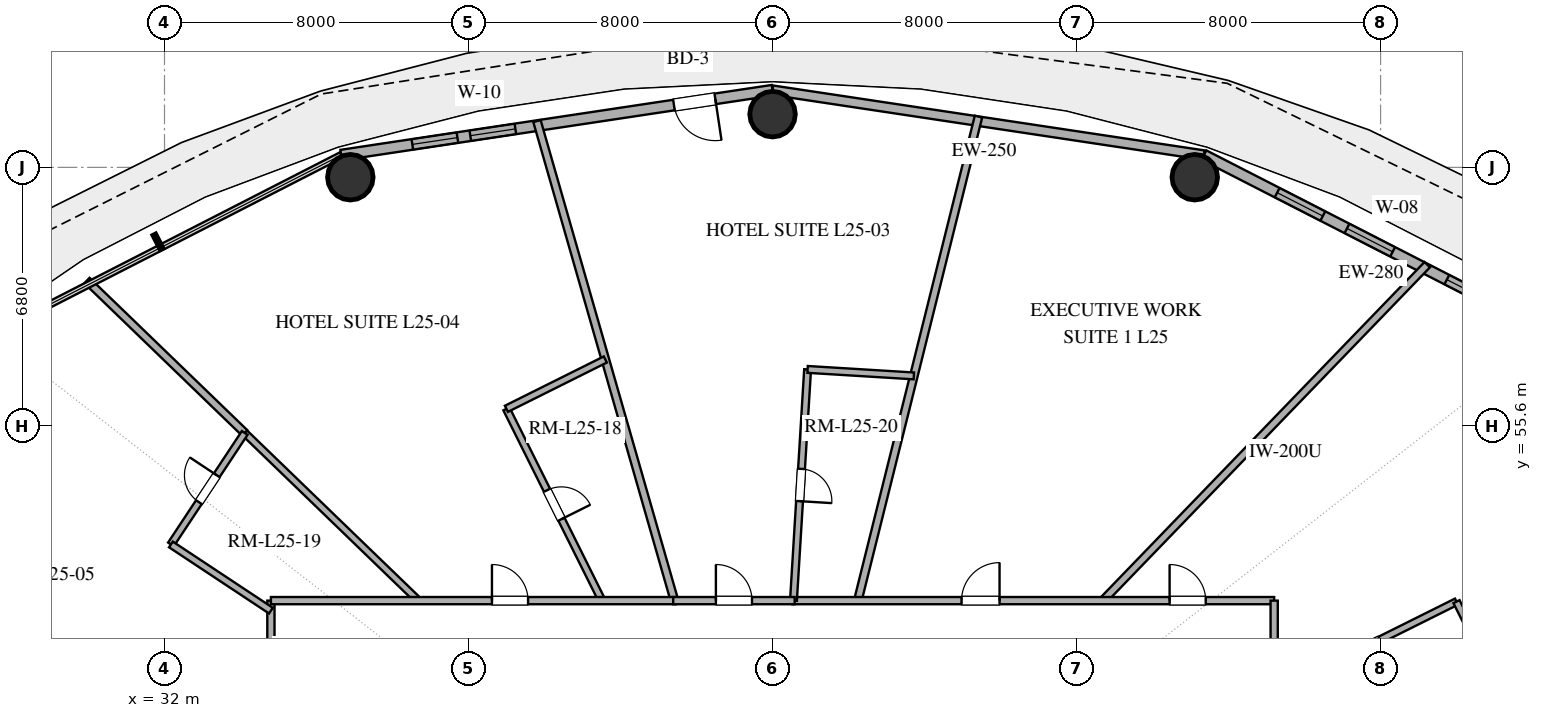
"""IFC4 building model, lengths in metres.
Left out: names, types, materials, properties, quantities, classifications, styles, units other than length and angle.
Written with IfcOpenShell. Run it as: python <this file> out.ifc"""

import sys

from ifc_helpers import new_model, si_unit, direction, frame, frame_2d, origin, origin_2d, place, context, subcontext, project, spatial, rectangle, hollow_circle, extrude, element, fill, save


model = new_model("IFC4")
c1 = context("Model", 3, precision=1e-05, world=origin(), true_north=direction((0.0, 1.0)))
c2 = subcontext(c1, "Body", "Model", "MODEL_VIEW")
j1 = project(units=[si_unit("LENGTHUNIT", "METRE"), si_unit("PLANEANGLEUNIT", "RADIAN")], contexts=[c1])
p1 = place(None, origin())
s1 = spatial("IfcSite", under=j1, at=p1, CompositionType="ELEMENT")
p2 = place(p1, origin())
s2 = spatial("IfcBuilding", under=s1, at=p2, CompositionType="ELEMENT")
p3 = place(p2, frame((0.0, 0.0, 102.0)))
s3 = spatial("IfcBuildingStorey", under=s2, at=p3, CompositionType="ELEMENT", Elevation=102.0)
for number, where, z_axis, x_axis in (
    (1, (59.11, 62.141, 0.0), (0.0, 0.0, 1.0), (1.0, 0.0, 0.0)),
    (2, (48.0, 63.8, 0.0), (0.0, 0.0, 1.0), (1.0, 0.0, 0.0)),
    (3, (36.89, 62.141, 0.0), (0.0, 0.0, 1.0), (1.0, 0.0, 0.0)),
):
    element("IfcColumn", number, at=place(p3, frame(where, z_axis=z_axis, x_axis=x_axis)), inside=s3, PredefinedType="COLUMN", context=c2, shape_type="SweptSolid", body=[
        extrude(hollow_circle(Radius=0.6, WallThickness=0.032, at=origin_2d()), origin(), (0.0, 0.0, 1.0), 3.38),
    ])
p4 = place(p3, frame((68.84, 57.86, 0.0), z_axis=(0.0, 0.0, 1.0), x_axis=(-0.889959505023, 0.45603955905, 0.0)))
e4 = element("IfcWall", 4, at=p4, inside=s3, PredefinedType="SOLIDWALL", context=c2, shape_type="SweptSolid", body=[
    extrude(rectangle(XDim=10.662, YDim=0.28, at=frame_2d((5.331, 0.0))), origin(), (0.0, 0.0, 1.0), 3.38),
])
p5 = place(p4, frame((1.979, 0.0, 0.85)))
e5 = element("IfcOpeningElement", 5, at=p5, cuts=e4, PredefinedType="OPENING", context=c2, shape_type="SweptSolid", body=[
    extrude(rectangle(XDim=1.5, YDim=1.8, at=frame_2d((0.75, 0.9))), frame((0.0, 0.15, 0.0), z_axis=(0.0, -1.0, 0.0), x_axis=(1.0, 0.0, 0.0)), (0.0, 0.0, 1.0), 0.3),
])
p6 = place(p4, frame((5.082, 0.0, 0.85)))
e6 = element("IfcOpeningElement", 6, at=p6, cuts=e4, PredefinedType="OPENING", context=c2, shape_type="SweptSolid", body=[
    extrude(rectangle(XDim=1.35, YDim=1.8, at=frame_2d((0.675, 0.9))), frame((0.0, 0.15, 0.0), z_axis=(0.0, -1.0, 0.0), x_axis=(1.0, 0.0, 0.0)), (0.0, 0.0, 1.0), 0.3),
])
p7 = place(p4, frame((7.146, 0.0, 0.85)))
e7 = element("IfcOpeningElement", 7, at=p7, cuts=e4, PredefinedType="OPENING", context=c2, shape_type="SweptSolid", body=[
    extrude(rectangle(XDim=1.35, YDim=1.8, at=frame_2d((0.675, 0.9))), frame((0.0, 0.15, 0.0), z_axis=(0.0, -1.0, 0.0), x_axis=(1.0, 0.0, 0.0)), (0.0, 0.0, 1.0), 0.3),
])
p8 = place(p3, frame((59.351, 62.723, 0.0), z_axis=(0.0, 0.0, 1.0), x_axis=(-0.988877774656, 0.148730450117, 0.0)))
e8 = element("IfcWall", 8, at=p8, inside=s3, PredefinedType="SOLIDWALL", context=c2, shape_type="SweptSolid", body=[
    extrude(rectangle(XDim=11.479, YDim=0.25, at=frame_2d((5.74, 0.0))), origin(), (0.0, 0.0, 1.0), 3.38),
])
p9 = place(p3, frame((48.0, 64.43, 0.0), z_axis=(0.0, 0.0, 1.0), x_axis=(-0.988877774656, -0.148730450117, 0.0)))
e9 = element("IfcWall", 9, at=p9, inside=s3, PredefinedType="SOLIDWALL", context=c2, shape_type="SweptSolid", body=[
    extrude(rectangle(XDim=11.479, YDim=0.28, at=frame_2d((5.74, 0.0))), origin(), (0.0, 0.0, 1.0), 3.38),
])
p10 = place(p9, frame((1.524, 0.0, 0.0)))
e10 = element("IfcOpeningElement", 10, at=p10, cuts=e9, PredefinedType="OPENING", context=c2, shape_type="SweptSolid", body=[
    extrude(rectangle(XDim=1.1, YDim=2.25, at=frame_2d((0.55, 1.125))), frame((0.0, 0.15, 0.0), z_axis=(0.0, -1.0, 0.0), x_axis=(1.0, 0.0, 0.0)), (0.0, 0.0, 1.0), 0.3),
])
p11 = place(p9, frame((6.843, 0.0, 0.85)))
e11 = element("IfcOpeningElement", 11, at=p11, cuts=e9, PredefinedType="OPENING", context=c2, shape_type="SweptSolid", body=[
    extrude(rectangle(XDim=1.2, YDim=1.6, at=frame_2d((0.6, 0.8))), frame((0.0, 0.15, 0.0), z_axis=(0.0, -1.0, 0.0), x_axis=(1.0, 0.0, 0.0)), (0.0, 0.0, 1.0), 0.3),
])
p12 = place(p9, frame((8.385, 0.0, 0.85)))
e12 = element("IfcOpeningElement", 12, at=p12, cuts=e9, PredefinedType="OPENING", context=c2, shape_type="SweptSolid", body=[
    extrude(rectangle(XDim=1.2, YDim=1.6, at=frame_2d((0.6, 0.8))), frame((0.0, 0.15, 0.0), z_axis=(0.0, -1.0, 0.0), x_axis=(1.0, 0.0, 0.0)), (0.0, 0.0, 1.0), 0.3),
])
p13 = place(p3, frame((65.228, 59.84, 0.0), z_axis=(0.0, 0.0, 1.0), x_axis=(-0.694672506389, -0.719326149161, 0.0)))
e13 = element("IfcWall", 13, at=p13, inside=s3, PredefinedType="PARTITIONING", context=c2, shape_type="SweptSolid", body=[
    extrude(rectangle(XDim=12.289, YDim=0.2, at=frame_2d((6.145, 0.0))), origin(), (0.0, 0.0, 1.0), 2.74),
])
p14 = place(p3, frame((50.244, 51.0, 0.0), z_axis=(0.0, 0.0, 1.0), x_axis=(0.241918476077, 0.970296578852, 0.0)))
e14 = element("IfcWall", 14, at=p14, inside=s3, PredefinedType="PARTITIONING", context=c2, shape_type="SweptSolid", body=[
    extrude(rectangle(XDim=13.125, YDim=0.2, at=frame_2d((6.563, 0.0))), origin(), (0.0, 0.0, 1.0), 2.74),
])
p15 = place(p3, frame((45.419, 51.0, 0.0), z_axis=(0.0, 0.0, 1.0), x_axis=(-0.275639731411, 0.961261014745, 0.0)))
e15 = element("IfcWall", 15, at=p15, inside=s3, PredefinedType="PARTITIONING", context=c2, shape_type="SweptSolid", body=[
    extrude(rectangle(XDim=13.126, YDim=0.2, at=frame_2d((6.563, 0.0))), origin(), (0.0, 0.0, 1.0), 2.74),
])
p16 = place(p3, frame((48.518, 51.0, 0.0), z_axis=(0.0, 0.0, 1.0), x_axis=(1.0, 0.0, 0.0)))
e16 = element("IfcWall", 16, at=p16, inside=s3, PredefinedType="PARTITIONING", context=c2, shape_type="SweptSolid", body=[
    extrude(rectangle(XDim=12.682, YDim=0.19, at=frame_2d((6.341, 0.0))), origin(), (0.0, 0.0, 1.0), 2.74),
])
p17 = place(p16, frame((4.455, 0.0, 0.0)))
e17 = element("IfcOpeningElement", 17, at=p17, cuts=e16, PredefinedType="OPENING", context=c2, shape_type="SweptSolid", body=[
    extrude(rectangle(XDim=1.0, YDim=2.2, at=frame_2d((0.5, 1.1))), frame((0.0, 0.105, 0.0), z_axis=(0.0, -1.0, 0.0), x_axis=(1.0, 0.0, 0.0)), (0.0, 0.0, 1.0), 0.21),
])
p18 = place(p16, frame((9.93, 0.0, 0.0)))
e18 = element("IfcOpeningElement", 18, at=p18, cuts=e16, PredefinedType="OPENING", context=c2, shape_type="SweptSolid", body=[
    extrude(rectangle(XDim=0.95, YDim=2.15, at=frame_2d((0.475, 1.075))), frame((0.0, 0.105, 0.0), z_axis=(0.0, -1.0, 0.0), x_axis=(1.0, 0.0, 0.0)), (0.0, 0.0, 1.0), 0.21),
])
p19 = place(p3, frame((34.111, 55.413, 0.0), z_axis=(0.0, 0.0, 1.0), x_axis=(0.719318009274, -0.694680935059, 0.0)))
e19 = element("IfcWall", 19, at=p19, inside=s3, PredefinedType="PLUMBINGWALL", context=c2, shape_type="SweptSolid", body=[
    extrude(rectangle(XDim=6.352, YDim=0.18, at=frame_2d((3.176, 0.0))), origin(), (0.0, 0.0, 1.0), 2.74),
])
p20 = place(p3, frame((48.923, 57.084, 0.0), z_axis=(0.0, 0.0, 1.0), x_axis=(-0.061044096749, -0.998135070144, 0.0)))
e20 = element("IfcWall", 20, at=p20, inside=s3, PredefinedType="PLUMBINGWALL", context=c2, shape_type="SweptSolid", body=[
    extrude(rectangle(XDim=6.095, YDim=0.18, at=frame_2d((3.048, 0.0))), origin(), (0.0, 0.0, 1.0), 2.74),
])
p21 = place(p20, frame((2.623, 0.0, 0.0)))
e21 = element("IfcOpeningElement", 21, at=p21, cuts=e20, PredefinedType="OPENING", context=c2, shape_type="SweptSolid", body=[
    extrude(rectangle(XDim=0.85, YDim=2.1, at=frame_2d((0.425, 1.05))), frame((0.0, 0.1, 0.0), z_axis=(0.0, -1.0, 0.0), x_axis=(1.0, 0.0, 0.0)), (0.0, 0.0, 1.0), 0.2),
])
p22 = place(p3, frame((29.959, 59.422, 0.0), z_axis=(0.0, 0.0, 1.0), x_axis=(0.719370121813, -0.694626970281, 0.0)))
e22 = element("IfcWall", 22, at=p22, inside=s3, PredefinedType="PARTITIONING", context=c2, shape_type="SweptSolid", body=[
    extrude(rectangle(XDim=5.772, YDim=0.2, at=frame_2d((2.886, 0.0))), origin(), (0.0, 0.0, 1.0), 2.74),
])
p23 = place(p3, frame((40.997, 56.047, 0.0), z_axis=(0.0, 0.0, 1.0), x_axis=(0.446174269641, -0.894946099556, 0.0)))
e23 = element("IfcWall", 23, at=p23, inside=s3, PredefinedType="PLUMBINGWALL", context=c2, shape_type="SweptSolid", body=[
    extrude(rectangle(XDim=5.639, YDim=0.18, at=frame_2d((2.82, 0.0))), origin(), (0.0, 0.0, 1.0), 2.74),
])
p24 = place(p23, frame((2.395, 0.0, 0.0)))
e24 = element("IfcOpeningElement", 24, at=p24, cuts=e23, PredefinedType="OPENING", context=c2, shape_type="SweptSolid", body=[
    extrude(rectangle(XDim=0.85, YDim=2.1, at=frame_2d((0.425, 1.05))), frame((0.0, 0.1, 0.0), z_axis=(0.0, -1.0, 0.0), x_axis=(1.0, 0.0, 0.0)), (0.0, 0.0, 1.0), 0.2),
])
p25 = place(p3, frame((34.8, 42.775, 0.0), z_axis=(0.0, 0.0, 1.0), x_axis=(0.0, 1.0, 0.0)))
e25 = element("IfcWall", 25, at=p25, inside=s3, PredefinedType="PARTITIONING", context=c2, shape_type="SweptSolid", body=[
    extrude(rectangle(XDim=8.225, YDim=0.19, at=frame_2d((4.112, 0.0))), origin(), (0.0, 0.0, 1.0), 2.74),
])
p26 = place(p25, frame((4.767, 0.0, 0.0)))
e26 = element("IfcOpeningElement", 26, at=p26, cuts=e25, PredefinedType="OPENING", context=c2, shape_type="SweptSolid", body=[
    extrude(rectangle(XDim=0.95, YDim=2.15, at=frame_2d((0.475, 1.075))), frame((0.0, 0.105, 0.0), z_axis=(0.0, -1.0, 0.0), x_axis=(1.0, 0.0, 0.0)), (0.0, 0.0, 1.0), 0.21),
])
p27 = place(p3, frame((65.998, 50.973, 0.0), z_axis=(0.0, 0.0, 1.0), x_axis=(-0.894936648514, -0.446193226244, 0.0)))
e27 = element("IfcWall", 27, at=p27, inside=s3, PredefinedType="PLUMBINGWALL", context=c2, shape_type="SweptSolid", body=[
    extrude(rectangle(XDim=5.361, YDim=0.18, at=frame_2d((2.681, 0.0))), origin(), (0.0, 0.0, 1.0), 2.74),
])
p28 = place(p27, frame((2.256, 0.0, 0.0)))
e28 = element("IfcOpeningElement", 28, at=p28, cuts=e27, PredefinedType="OPENING", context=c2, shape_type="SweptSolid", body=[
    extrude(rectangle(XDim=0.85, YDim=2.1, at=frame_2d((0.425, 1.05))), frame((0.0, 0.1, 0.0), z_axis=(0.0, -1.0, 0.0), x_axis=(1.0, 0.0, 0.0)), (0.0, 0.0, 1.0), 0.2),
])
p29 = place(p3, frame((34.8, 51.0, 0.0), z_axis=(0.0, 0.0, 1.0), x_axis=(1.0, 0.0, 0.0)))
e29 = element("IfcWall", 29, at=p29, inside=s3, PredefinedType="PARTITIONING", context=c2, shape_type="SweptSolid", body=[
    extrude(rectangle(XDim=10.653, YDim=0.19, at=frame_2d((5.326, 0.0))), origin(), (0.0, 0.0, 1.0), 2.74),
])
p30 = place(p29, frame((5.816, 0.0, 0.0)))
e30 = element("IfcOpeningElement", 30, at=p30, cuts=e29, PredefinedType="OPENING", context=c2, shape_type="SweptSolid", body=[
    extrude(rectangle(XDim=0.95, YDim=2.15, at=frame_2d((0.475, 1.075))), frame((0.0, 0.105, 0.0), z_axis=(0.0, -1.0, 0.0), x_axis=(1.0, 0.0, 0.0)), (0.0, 0.0, 1.0), 0.21),
])
p31 = place(p3, frame((61.2, 51.0, 0.0), z_axis=(0.0, 0.0, 1.0), x_axis=(0.0, -1.0, 0.0)))
e31 = element("IfcWall", 31, at=p31, inside=s3, PredefinedType="PARTITIONING", context=c2, shape_type="SweptSolid", body=[
    extrude(rectangle(XDim=9.839, YDim=0.19, at=frame_2d((4.92, 0.0))), origin(), (0.0, 0.0, 1.0), 2.74),
])
p32 = place(p31, frame((7.035, 0.0, 0.0)))
e32 = element("IfcOpeningElement", 32, at=p32, cuts=e31, PredefinedType="OPENING", context=c2, shape_type="SweptSolid", body=[
    extrude(rectangle(XDim=0.95, YDim=2.15, at=frame_2d((0.475, 1.075))), frame((0.0, 0.105, 0.0), z_axis=(0.0, -1.0, 0.0), x_axis=(1.0, 0.0, 0.0)), (0.0, 0.0, 1.0), 0.21),
])
p33 = place(p3, frame((67.661, 47.638, 0.0), z_axis=(0.0, 0.0, 1.0), x_axis=(-0.446243949247, 0.894911357488, 0.0)))
e33 = element("IfcWall", 33, at=p33, inside=s3, PredefinedType="PLUMBINGWALL", context=c2, shape_type="SweptSolid", body=[
    extrude(rectangle(XDim=3.727, YDim=0.18, at=frame_2d((1.864, 0.0))), origin(), (0.0, 0.0, 1.0), 2.74),
])
p34 = place(p3, frame((32.169, 52.479, 0.0), z_axis=(0.0, 0.0, 1.0), x_axis=(0.551959146688, 0.833871153349, 0.0)))
e34 = element("IfcWall", 34, at=p34, inside=s3, PredefinedType="PLUMBINGWALL", context=c2, shape_type="SweptSolid", body=[
    extrude(rectangle(XDim=3.519, YDim=0.18, at=frame_2d((1.759, 0.0))), origin(), (0.0, 0.0, 1.0), 2.74),
])
p35 = place(p34, frame((1.334, 0.0, 0.0)))
e35 = element("IfcOpeningElement", 35, at=p35, cuts=e34, PredefinedType="OPENING", context=c2, shape_type="SweptSolid", body=[
    extrude(rectangle(XDim=0.85, YDim=2.1, at=frame_2d((0.425, 1.05))), frame((0.0, 0.1, 0.0), z_axis=(0.0, -1.0, 0.0), x_axis=(1.0, 0.0, 0.0)), (0.0, 0.0, 1.0), 0.2),
])
p36 = place(p3, frame((45.386, 51.0, 0.0), z_axis=(0.0, 0.0, 1.0), x_axis=(1.0, 0.0, 0.0)))
e36 = element("IfcWall", 36, at=p36, inside=s3, PredefinedType="PARTITIONING", context=c2, shape_type="SweptSolid", body=[
    extrude(rectangle(XDim=3.197, YDim=0.19, at=frame_2d((1.598, 0.0))), origin(), (0.0, 0.0, 1.0), 2.74),
])
p37 = place(p36, frame((1.123, 0.0, 0.0)))
e37 = element("IfcOpeningElement", 37, at=p37, cuts=e36, PredefinedType="OPENING", context=c2, shape_type="SweptSolid", body=[
    extrude(rectangle(XDim=0.95, YDim=2.15, at=frame_2d((0.475, 1.075))), frame((0.0, 0.105, 0.0), z_axis=(0.0, -1.0, 0.0), x_axis=(1.0, 0.0, 0.0)), (0.0, 0.0, 1.0), 0.21),
])
p38 = place(p3, frame((34.8, 50.737, 0.0), z_axis=(0.0, 0.0, 1.0), x_axis=(-0.833855219674, 0.5519832177, 0.0)))
e38 = element("IfcWall", 38, at=p38, inside=s3, PredefinedType="PLUMBINGWALL", context=c2, shape_type="SweptSolid", body=[
    extrude(rectangle(XDim=3.155, YDim=0.18, at=frame_2d((1.578, 0.0))), origin(), (0.0, 0.0, 1.0), 2.74),
])
p39 = place(p3, frame((43.6, 57.345, 0.0), z_axis=(0.0, 0.0, 1.0), x_axis=(-0.894913437672, -0.446239777558, 0.0)))
e39 = element("IfcWall", 39, at=p39, inside=s3, PredefinedType="PLUMBINGWALL", context=c2, shape_type="SweptSolid", body=[
    extrude(rectangle(XDim=2.909, YDim=0.18, at=frame_2d((1.455, 0.0))), origin(), (0.0, 0.0, 1.0), 2.74),
])
p40 = place(p3, frame((51.718, 56.913, 0.0), z_axis=(0.0, 0.0, 1.0), x_axis=(-0.998136779925, 0.061016133608, 0.0)))
e40 = element("IfcWall", 40, at=p40, inside=s3, PredefinedType="PLUMBINGWALL", context=c2, shape_type="SweptSolid", body=[
    extrude(rectangle(XDim=2.801, YDim=0.18, at=frame_2d((1.4, 0.0))), origin(), (0.0, 0.0, 1.0), 2.74),
])
p41 = place(p5, origin())
e41 = element("IfcWindow", 41, at=p41, inside=s3, PartitioningType="SINGLE_PANEL", PredefinedType="WINDOW", context=c2, shape_type="SweptSolid", body=[
    extrude(rectangle(XDim=1.5, YDim=1.8, at=frame_2d((0.75, 0.9))), frame((0.0, 0.03, 0.0), z_axis=(0.0, -1.0, 0.0), x_axis=(1.0, 0.0, 0.0)), (0.0, 0.0, 1.0), 0.06),
])
fill(e5, e41)
p42 = place(p6, origin())
e42 = element("IfcWindow", 42, at=p42, inside=s3, PartitioningType="SINGLE_PANEL", PredefinedType="WINDOW", context=c2, shape_type="SweptSolid", body=[
    extrude(rectangle(XDim=1.35, YDim=1.8, at=frame_2d((0.675, 0.9))), frame((0.0, 0.03, 0.0), z_axis=(0.0, -1.0, 0.0), x_axis=(1.0, 0.0, 0.0)), (0.0, 0.0, 1.0), 0.06),
])
fill(e6, e42)
p43 = place(p7, origin())
e43 = element("IfcWindow", 43, at=p43, inside=s3, PartitioningType="SINGLE_PANEL", PredefinedType="WINDOW", context=c2, shape_type="SweptSolid", body=[
    extrude(rectangle(XDim=1.35, YDim=1.8, at=frame_2d((0.675, 0.9))), frame((0.0, 0.03, 0.0), z_axis=(0.0, -1.0, 0.0), x_axis=(1.0, 0.0, 0.0)), (0.0, 0.0, 1.0), 0.06),
])
fill(e7, e43)
p44 = place(p10, origin())
e44 = element("IfcDoor", 44, at=p44, inside=s3, OperationType="SINGLE_SWING_LEFT", PredefinedType="DOOR", context=c2, shape_type="SweptSolid", body=[
    extrude(rectangle(XDim=1.1, YDim=2.25, at=frame_2d((0.55, 1.125))), frame((0.0, 0.025, 0.0), z_axis=(0.0, -1.0, 0.0), x_axis=(1.0, 0.0, 0.0)), (0.0, 0.0, 1.0), 0.05),
])
fill(e10, e44)
p45 = place(p11, origin())
e45 = element("IfcWindow", 45, at=p45, inside=s3, PartitioningType="SINGLE_PANEL", PredefinedType="WINDOW", context=c2, shape_type="SweptSolid", body=[
    extrude(rectangle(XDim=1.2, YDim=1.6, at=frame_2d((0.6, 0.8))), frame((0.0, 0.03, 0.0), z_axis=(0.0, -1.0, 0.0), x_axis=(1.0, 0.0, 0.0)), (0.0, 0.0, 1.0), 0.06),
])
fill(e11, e45)
p46 = place(p12, origin())
e46 = element("IfcWindow", 46, at=p46, inside=s3, PartitioningType="SINGLE_PANEL", PredefinedType="WINDOW", context=c2, shape_type="SweptSolid", body=[
    extrude(rectangle(XDim=1.2, YDim=1.6, at=frame_2d((0.6, 0.8))), frame((0.0, 0.03, 0.0), z_axis=(0.0, -1.0, 0.0), x_axis=(1.0, 0.0, 0.0)), (0.0, 0.0, 1.0), 0.06),
])
fill(e12, e46)
p47 = place(p17, origin())
e47 = element("IfcDoor", 47, at=p47, inside=s3, OperationType="SINGLE_SWING_RIGHT", PredefinedType="DOOR", context=c2, shape_type="SweptSolid", body=[
    extrude(rectangle(XDim=1.0, YDim=2.2, at=frame_2d((0.5, 1.1))), frame((0.0, 0.025, 0.0), z_axis=(0.0, -1.0, 0.0), x_axis=(1.0, 0.0, 0.0)), (0.0, 0.0, 1.0), 0.05),
])
fill(e17, e47)
p48 = place(p18, origin())
e48 = element("IfcDoor", 48, at=p48, inside=s3, OperationType="SINGLE_SWING_LEFT", PredefinedType="DOOR", context=c2, shape_type="SweptSolid", body=[
    extrude(rectangle(XDim=0.95, YDim=2.15, at=frame_2d((0.475, 1.075))), frame((0.0, 0.025, 0.0), z_axis=(0.0, -1.0, 0.0), x_axis=(1.0, 0.0, 0.0)), (0.0, 0.0, 1.0), 0.05),
])
fill(e18, e48)
p49 = place(p21, origin())
e49 = element("IfcDoor", 49, at=p49, inside=s3, OperationType="SINGLE_SWING_RIGHT", PredefinedType="DOOR", context=c2, shape_type="SweptSolid", body=[
    extrude(rectangle(XDim=0.85, YDim=2.1, at=frame_2d((0.425, 1.05))), frame((0.0, 0.025, 0.0), z_axis=(0.0, -1.0, 0.0), x_axis=(1.0, 0.0, 0.0)), (0.0, 0.0, 1.0), 0.05),
])
fill(e21, e49)
p50 = place(p24, origin())
e50 = element("IfcDoor", 50, at=p50, inside=s3, OperationType="SINGLE_SWING_RIGHT", PredefinedType="DOOR", context=c2, shape_type="SweptSolid", body=[
    extrude(rectangle(XDim=0.85, YDim=2.1, at=frame_2d((0.425, 1.05))), frame((0.0, 0.025, 0.0), z_axis=(0.0, -1.0, 0.0), x_axis=(1.0, 0.0, 0.0)), (0.0, 0.0, 1.0), 0.05),
])
fill(e24, e50)
p51 = place(p30, origin())
e51 = element("IfcDoor", 51, at=p51, inside=s3, OperationType="SINGLE_SWING_LEFT", PredefinedType="DOOR", context=c2, shape_type="SweptSolid", body=[
    extrude(rectangle(XDim=0.95, YDim=2.15, at=frame_2d((0.475, 1.075))), frame((0.0, 0.025, 0.0), z_axis=(0.0, -1.0, 0.0), x_axis=(1.0, 0.0, 0.0)), (0.0, 0.0, 1.0), 0.05),
])
fill(e30, e51)
p52 = place(p35, origin())
e52 = element("IfcDoor", 52, at=p52, inside=s3, OperationType="SINGLE_SWING_RIGHT", PredefinedType="DOOR", context=c2, shape_type="SweptSolid", body=[
    extrude(rectangle(XDim=0.85, YDim=2.1, at=frame_2d((0.425, 1.05))), frame((0.0, 0.025, 0.0), z_axis=(0.0, -1.0, 0.0), x_axis=(1.0, 0.0, 0.0)), (0.0, 0.0, 1.0), 0.05),
])
fill(e35, e52)
p53 = place(p37, origin())
e53 = element("IfcDoor", 53, at=p53, inside=s3, OperationType="SINGLE_SWING_LEFT", PredefinedType="DOOR", context=c2, shape_type="SweptSolid", body=[
    extrude(rectangle(XDim=0.95, YDim=2.15, at=frame_2d((0.475, 1.075))), frame((0.0, 0.025, 0.0), z_axis=(0.0, -1.0, 0.0), x_axis=(1.0, 0.0, 0.0)), (0.0, 0.0, 1.0), 0.05),
])
fill(e37, e53)
save(model, sys.argv[1])
